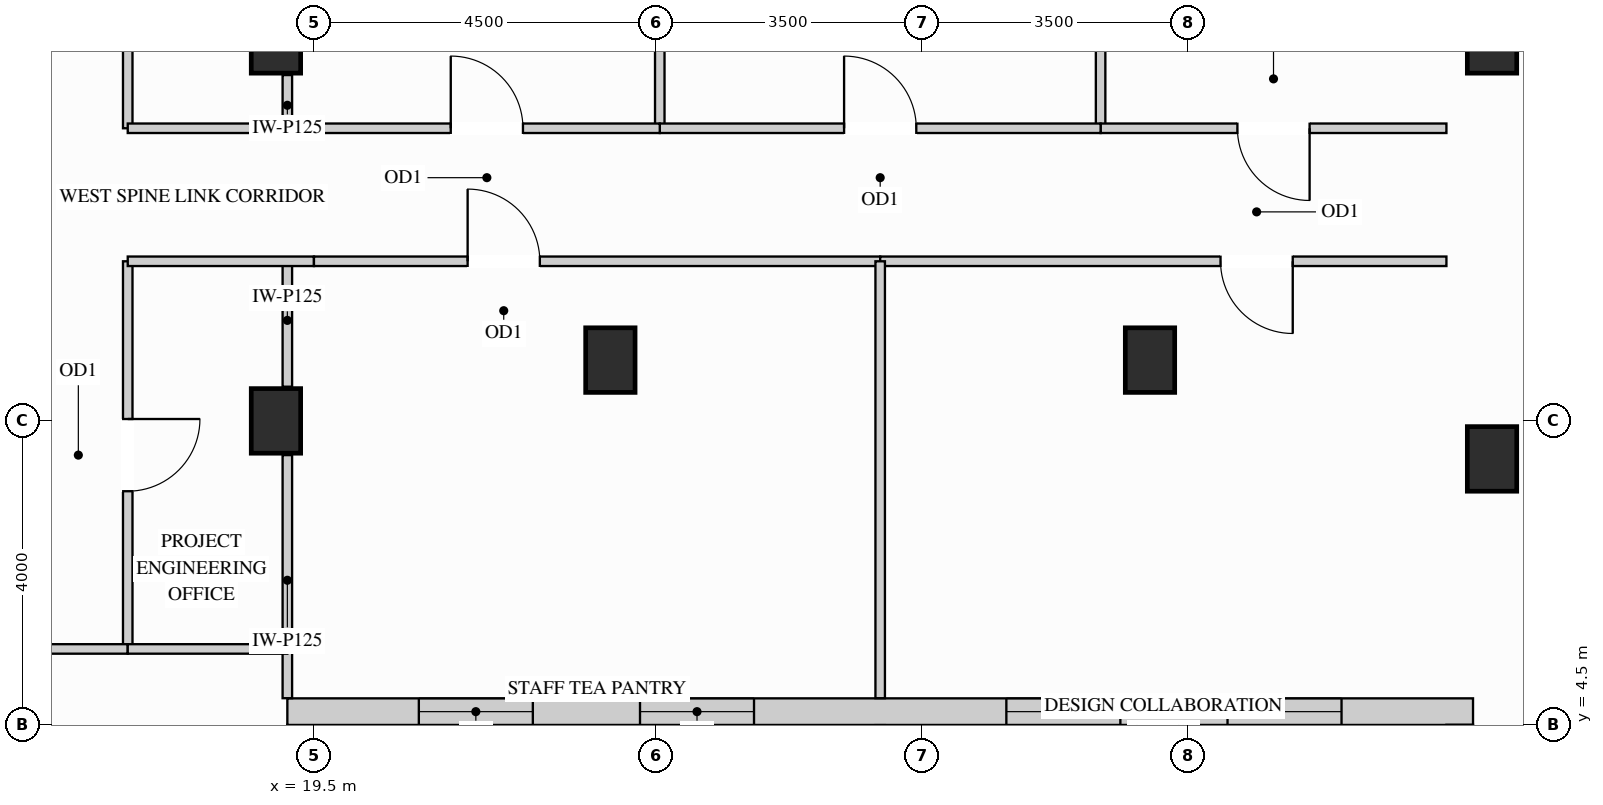
"""IFC4 building model, lengths in metres.
Left out: names, types, materials, properties, quantities, classifications, styles, units other than length and angle.
Written with IfcOpenShell. Run it as: python <this file> out.ifc"""

import sys

from ifc_helpers import new_model, si_unit, direction, frame, frame_2d, origin, origin_2d, place, context, subcontext, project, spatial, rectangle, extrude, source, transform, mapped, element, fill, save


model = new_model("IFC4")
c1 = context("Model", 3, precision=1e-05, world=origin(), true_north=direction((0.0, 1.0)))
c2 = subcontext(c1, "Body", "Model", "MODEL_VIEW")
j1 = project(units=[si_unit("LENGTHUNIT", "METRE"), si_unit("PLANEANGLEUNIT", "RADIAN")], contexts=[c1])
p1 = place(None, origin())
s1 = spatial("IfcSite", under=j1, at=p1, CompositionType="ELEMENT")
p2 = place(p1, origin())
s2 = spatial("IfcBuilding", under=s1, at=p2, CompositionType="ELEMENT")
p3 = place(p2, frame((0.0, 0.0, 216.0)))
s3 = spatial("IfcBuildingStorey", under=s2, at=p3, CompositionType="ELEMENT", Elevation=216.0)
m1 = source(origin(), c2, "Body", "SweptSolid", [
    extrude(rectangle(XDim=0.65, YDim=0.85, at=origin_2d()), origin(), (0.0, 0.0, 1.0), 3.4),
])
for number, where, z_axis, x_axis in (
    (1, (19.0, 13.5, 0.0), (0.0, 0.0, 1.0), (1.0, 0.0, 0.0)),
    (2, (19.0, 8.5, 0.0), (0.0, 0.0, 1.0), (1.0, 0.0, 0.0)),
    (3, (35.0, 13.5, 0.0), (0.0, 0.0, 1.0), (1.0, 0.0, 0.0)),
    (4, (35.0, 8.0, 0.0), (0.0, 0.0, 1.0), (1.0, 0.0, 0.0)),
    (5, (23.4, 9.3, 0.0), (0.0, 0.0, 1.0), (1.0, 0.0, 0.0)),
    (6, (30.5, 9.3, 0.0), (0.0, 0.0, 1.0), (1.0, 0.0, 0.0)),
):
    element("IfcColumn", number, at=place(p3, frame(where, z_axis=z_axis, x_axis=x_axis)), inside=s3, PredefinedType="COLUMN", context=c2, shape_type="MappedRepresentation", body=[
        mapped(m1, transform((0.0, 0.0, 0.0), x_axis=(1.0, 0.0, 0.0), y_axis=(0.0, 1.0, 0.0), z_axis=(0.0, 0.0, 1.0))),
    ])
m2 = source(origin(), c2, "Body", "SweptSolid", [
    extrude(rectangle(XDim=0.579, YDim=0.35, at=frame_2d((0.29, 0.0))), origin(), (0.0, 0.0, 1.0), 2.773),
])
p4 = place(p3, frame((19.325, 3.923, 0.0), z_axis=(0.0, 0.0, 1.0), x_axis=(0.0, 1.0, 0.0)))
e7 = element("IfcWall", 7, at=p4, inside=s3, PredefinedType="SOLIDWALL", context=c2, shape_type="MappedRepresentation", body=[
    mapped(m2, transform((0.0, 0.0, 0.0), x_axis=(1.0, 0.0, 0.0), y_axis=(0.0, 1.0, 0.0), z_axis=(0.0, 0.0, 1.0))),
])
p5 = place(p3, frame((19.15, 4.675, 0.0), z_axis=(0.0, 0.0, 1.0), x_axis=(1.0, 0.0, 0.0)))
e8 = element("IfcWall", 8, at=p5, inside=s3, PredefinedType="SOLIDWALL", context=c2, shape_type="SweptSolid", body=[
    extrude(rectangle(XDim=15.6, YDim=0.35, at=frame_2d((7.8, 0.0))), origin(), (0.0, 0.0, 1.0), 3.385),
])
p6 = place(p5, frame((1.73, 0.0, 0.78)))
e9 = element("IfcOpeningElement", 9, at=p6, cuts=e8, PredefinedType="OPENING", context=c2, shape_type="SweptSolid", body=[
    extrude(rectangle(XDim=1.5, YDim=2.0, at=frame_2d((0.75, 1.0))), frame((0.0, 0.185, 0.0), z_axis=(0.0, -1.0, 0.0), x_axis=(1.0, 0.0, 0.0)), (0.0, 0.0, 1.0), 0.37),
])
p7 = place(p5, frame((4.64, 0.0, 0.78)))
e10 = element("IfcOpeningElement", 10, at=p7, cuts=e8, PredefinedType="OPENING", context=c2, shape_type="SweptSolid", body=[
    extrude(rectangle(XDim=1.5, YDim=2.0, at=frame_2d((0.75, 1.0))), frame((0.0, 0.185, 0.0), z_axis=(0.0, -1.0, 0.0), x_axis=(1.0, 0.0, 0.0)), (0.0, 0.0, 1.0), 0.37),
])
p8 = place(p5, frame((9.46, 0.0, 0.78)))
e11 = element("IfcOpeningElement", 11, at=p8, cuts=e8, PredefinedType="OPENING", context=c2, shape_type="SweptSolid", body=[
    extrude(rectangle(XDim=1.5, YDim=2.0, at=frame_2d((0.75, 1.0))), frame((0.0, 0.185, 0.0), z_axis=(0.0, -1.0, 0.0), x_axis=(1.0, 0.0, 0.0)), (0.0, 0.0, 1.0), 0.37),
])
p9 = place(p5, frame((12.37, 0.0, 0.78)))
e12 = element("IfcOpeningElement", 12, at=p9, cuts=e8, PredefinedType="OPENING", context=c2, shape_type="SweptSolid", body=[
    extrude(rectangle(XDim=1.5, YDim=2.0, at=frame_2d((0.75, 1.0))), frame((0.0, 0.185, 0.0), z_axis=(0.0, -1.0, 0.0), x_axis=(1.0, 0.0, 0.0)), (0.0, 0.0, 1.0), 0.37),
])
m3 = source(origin(), c2, "Body", "SweptSolid", [
    extrude(rectangle(XDim=0.579, YDim=0.35, at=frame_2d((0.29, 0.0))), origin(), (0.0, 0.0, 1.0), 3.385),
])
p10 = place(p3, frame((34.575, 4.502, 0.0), z_axis=(0.0, 0.0, 1.0), x_axis=(0.0, -1.0, 0.0)))
e13 = element("IfcWall", 13, at=p10, inside=s3, PredefinedType="SOLIDWALL", context=c2, shape_type="MappedRepresentation", body=[
    mapped(m3, transform((0.0, 0.0, 0.0), x_axis=(1.0, 0.0, 0.0), y_axis=(0.0, 1.0, 0.0), z_axis=(0.0, 0.0, 1.0))),
])
m4 = source(origin(), c2, "Body", "SweptSolid", [
    extrude(rectangle(XDim=0.7, YDim=0.125, at=frame_2d((0.35, 0.0))), origin(), (0.0, 0.0, 1.0), 2.773),
])
p11 = place(p3, frame((19.15, 12.35, 0.0), z_axis=(0.0, 0.0, 1.0), x_axis=(0.0, 1.0, 0.0)))
e14 = element("IfcWall", 14, at=p11, inside=s3, PredefinedType="PARTITIONING", context=c2, shape_type="MappedRepresentation", body=[
    mapped(m4, transform((0.0, 0.0, 0.0), x_axis=(1.0, 0.0, 0.0), y_axis=(0.0, 1.0, 0.0), z_axis=(0.0, 0.0, 1.0))),
])
m5 = source(origin(), c2, "Body", "SweptSolid", [
    extrude(rectangle(XDim=3.198, YDim=0.125, at=frame_2d((1.599, 0.0))), origin(), (0.0, 0.0, 1.0), 2.773),
])
p12 = place(p3, frame((19.15, 4.852, 0.0), z_axis=(0.0, 0.0, 1.0), x_axis=(0.0, 1.0, 0.0)))
e15 = element("IfcWall", 15, at=p12, inside=s3, PredefinedType="PARTITIONING", context=c2, shape_type="MappedRepresentation", body=[
    mapped(m5, transform((0.0, 0.0, 0.0), x_axis=(1.0, 0.0, 0.0), y_axis=(0.0, 1.0, 0.0), z_axis=(0.0, 0.0, 1.0))),
])
m6 = source(origin(), c2, "Body", "SweptSolid", [
    extrude(rectangle(XDim=1.65, YDim=0.125, at=frame_2d((0.825, 0.0))), origin(), (0.0, 0.0, 1.0), 2.773),
])
p13 = place(p3, frame((19.15, 8.95, 0.0), z_axis=(0.0, 0.0, 1.0), x_axis=(0.0, 1.0, 0.0)))
e16 = element("IfcWall", 16, at=p13, inside=s3, PredefinedType="PARTITIONING", context=c2, shape_type="MappedRepresentation", body=[
    mapped(m6, transform((0.0, 0.0, 0.0), x_axis=(1.0, 0.0, 0.0), y_axis=(0.0, 1.0, 0.0), z_axis=(0.0, 0.0, 1.0))),
])
p14 = place(p3, frame((17.05, 12.35, 0.0), z_axis=(0.0, 0.0, 1.0), x_axis=(0.0, 1.0, 0.0)))
e17 = element("IfcWall", 17, at=p14, inside=s3, PredefinedType="PARTITIONING", context=c2, shape_type="SweptSolid", body=[
    extrude(rectangle(XDim=5.75, YDim=0.125, at=frame_2d((2.875, 0.0))), origin(), (0.0, 0.0, 1.0), 3.385),
])
p15 = place(p14, frame((2.4, 0.0, 0.0)))
e18 = element("IfcOpeningElement", 18, at=p15, cuts=e17, PredefinedType="OPENING", context=c2, shape_type="SweptSolid", body=[
    extrude(rectangle(XDim=0.95, YDim=2.15, at=frame_2d((0.475, 1.075))), frame((0.0, 0.073, 0.0), z_axis=(0.0, -1.0, 0.0), x_axis=(1.0, 0.0, 0.0)), (0.0, 0.0, 1.0), 0.145),
])
p16 = place(p3, frame((17.05, 5.5, 0.0), z_axis=(0.0, 0.0, 1.0), x_axis=(0.0, 1.0, 0.0)))
e19 = element("IfcWall", 19, at=p16, inside=s3, PredefinedType="PARTITIONING", context=c2, shape_type="SweptSolid", body=[
    extrude(rectangle(XDim=5.1, YDim=0.125, at=frame_2d((2.55, 0.0))), origin(), (0.0, 0.0, 1.0), 3.385),
])
p17 = place(p16, frame((2.075, 0.0, 0.0)))
e20 = element("IfcOpeningElement", 20, at=p17, cuts=e19, PredefinedType="OPENING", context=c2, shape_type="SweptSolid", body=[
    extrude(rectangle(XDim=0.95, YDim=2.15, at=frame_2d((0.475, 1.075))), frame((0.0, 0.073, 0.0), z_axis=(0.0, -1.0, 0.0), x_axis=(1.0, 0.0, 0.0)), (0.0, 0.0, 1.0), 0.145),
])
m7 = source(origin(), c2, "Body", "SweptSolid", [
    extrude(rectangle(XDim=5.298, YDim=0.125, at=frame_2d((2.649, 0.0))), origin(), (0.0, 0.0, 1.0), 3.385),
])
for number, where, z_axis, x_axis in (
    (21, (24.05, 12.35, 0.0), (0.0, 0.0, 1.0), (0.0, 1.0, 0.0)),
    (22, (29.85, 12.35, 0.0), (0.0, 0.0, 1.0), (0.0, 1.0, 0.0)),
):
    element("IfcWall", number, at=place(p3, frame(where, z_axis=z_axis, x_axis=x_axis)), inside=s3, PredefinedType="PARTITIONING", context=c2, shape_type="MappedRepresentation", body=[
        mapped(m7, transform((0.0, 0.0, 0.0), x_axis=(1.0, 0.0, 0.0), y_axis=(0.0, 1.0, 0.0), z_axis=(0.0, 0.0, 1.0))),
    ])
p18 = place(p3, frame((29.85, 12.35, 0.0), z_axis=(0.0, 0.0, 1.0), x_axis=(1.0, 0.0, 0.0)))
e23 = element("IfcWall", 23, at=p18, inside=s3, PredefinedType="PARTITIONING", context=c2, shape_type="SweptSolid", body=[
    extrude(rectangle(XDim=4.55, YDim=0.125, at=frame_2d((2.275, 0.0))), origin(), (0.0, 0.0, 1.0), 3.385),
])
p19 = place(p18, frame((1.8, 0.0, 0.0)))
e24 = element("IfcOpeningElement", 24, at=p19, cuts=e23, PredefinedType="OPENING", context=c2, shape_type="SweptSolid", body=[
    extrude(rectangle(XDim=0.95, YDim=2.15, at=frame_2d((0.475, 1.075))), frame((0.0, 0.073, 0.0), z_axis=(0.0, -1.0, 0.0), x_axis=(1.0, 0.0, 0.0)), (0.0, 0.0, 1.0), 0.145),
])
p20 = place(p3, frame((24.05, 12.35, 0.0), z_axis=(0.0, 0.0, 1.0), x_axis=(1.0, 0.0, 0.0)))
e25 = element("IfcWall", 25, at=p20, inside=s3, PredefinedType="PARTITIONING", context=c2, shape_type="SweptSolid", body=[
    extrude(rectangle(XDim=5.8, YDim=0.125, at=frame_2d((2.9, 0.0))), origin(), (0.0, 0.0, 1.0), 3.385),
])
p21 = place(p20, frame((2.425, 0.0, 0.0)))
e26 = element("IfcOpeningElement", 26, at=p21, cuts=e25, PredefinedType="OPENING", context=c2, shape_type="SweptSolid", body=[
    extrude(rectangle(XDim=0.95, YDim=2.15, at=frame_2d((0.475, 1.075))), frame((0.0, 0.073, 0.0), z_axis=(0.0, -1.0, 0.0), x_axis=(1.0, 0.0, 0.0)), (0.0, 0.0, 1.0), 0.145),
])
m8 = source(origin(), c2, "Body", "SweptSolid", [
    extrude(rectangle(XDim=2.45, YDim=0.125, at=frame_2d((1.225, 0.0))), origin(), (0.0, 0.0, 1.0), 3.385),
])
p22 = place(p3, frame((17.05, 12.35, 0.0), z_axis=(0.0, 0.0, 1.0), x_axis=(1.0, 0.0, 0.0)))
e27 = element("IfcWall", 27, at=p22, inside=s3, PredefinedType="PARTITIONING", context=c2, shape_type="MappedRepresentation", body=[
    mapped(m8, transform((0.0, 0.0, 0.0), x_axis=(1.0, 0.0, 0.0), y_axis=(0.0, 1.0, 0.0), z_axis=(0.0, 0.0, 1.0))),
])
p23 = place(p3, frame((19.5, 12.35, 0.0), z_axis=(0.0, 0.0, 1.0), x_axis=(1.0, 0.0, 0.0)))
e28 = element("IfcWall", 28, at=p23, inside=s3, PredefinedType="PARTITIONING", context=c2, shape_type="SweptSolid", body=[
    extrude(rectangle(XDim=4.55, YDim=0.125, at=frame_2d((2.275, 0.0))), origin(), (0.0, 0.0, 1.0), 3.385),
])
p24 = place(p23, frame((1.8, 0.0, 0.0)))
e29 = element("IfcOpeningElement", 29, at=p24, cuts=e28, PredefinedType="OPENING", context=c2, shape_type="SweptSolid", body=[
    extrude(rectangle(XDim=0.95, YDim=2.15, at=frame_2d((0.475, 1.075))), frame((0.0, 0.073, 0.0), z_axis=(0.0, -1.0, 0.0), x_axis=(1.0, 0.0, 0.0)), (0.0, 0.0, 1.0), 0.145),
])
p25 = place(p3, frame((17.05, 10.6, 0.0), z_axis=(0.0, 0.0, 1.0), x_axis=(1.0, 0.0, 0.0)))
e30 = element("IfcWall", 30, at=p25, inside=s3, PredefinedType="PARTITIONING", context=c2, shape_type="MappedRepresentation", body=[
    mapped(m8, transform((0.0, 0.0, 0.0), x_axis=(1.0, 0.0, 0.0), y_axis=(0.0, 1.0, 0.0), z_axis=(0.0, 0.0, 1.0))),
])
p26 = place(p3, frame((19.5, 10.6, 0.0), z_axis=(0.0, 0.0, 1.0), x_axis=(1.0, 0.0, 0.0)))
e31 = element("IfcWall", 31, at=p26, inside=s3, PredefinedType="PARTITIONING", context=c2, shape_type="SweptSolid", body=[
    extrude(rectangle(XDim=7.45, YDim=0.125, at=frame_2d((3.725, 0.0))), origin(), (0.0, 0.0, 1.0), 3.385),
])
p27 = place(p26, frame((2.022, 0.0, 0.0)))
e32 = element("IfcOpeningElement", 32, at=p27, cuts=e31, PredefinedType="OPENING", context=c2, shape_type="SweptSolid", body=[
    extrude(rectangle(XDim=0.95, YDim=2.15, at=frame_2d((0.475, 1.075))), frame((0.0, 0.073, 0.0), z_axis=(0.0, -1.0, 0.0), x_axis=(1.0, 0.0, 0.0)), (0.0, 0.0, 1.0), 0.145),
])
p28 = place(p3, frame((26.95, 10.6, 0.0), z_axis=(0.0, 0.0, 1.0), x_axis=(1.0, 0.0, 0.0)))
e33 = element("IfcWall", 33, at=p28, inside=s3, PredefinedType="PARTITIONING", context=c2, shape_type="SweptSolid", body=[
    extrude(rectangle(XDim=7.45, YDim=0.125, at=frame_2d((3.725, 0.0))), origin(), (0.0, 0.0, 1.0), 3.385),
])
p29 = place(p28, frame((4.478, 0.0, 0.0)))
e34 = element("IfcOpeningElement", 34, at=p29, cuts=e33, PredefinedType="OPENING", context=c2, shape_type="SweptSolid", body=[
    extrude(rectangle(XDim=0.95, YDim=2.15, at=frame_2d((0.475, 1.075))), frame((0.0, 0.073, 0.0), z_axis=(0.0, -1.0, 0.0), x_axis=(1.0, 0.0, 0.0)), (0.0, 0.0, 1.0), 0.145),
])
m9 = source(origin(), c2, "Body", "SweptSolid", [
    extrude(rectangle(XDim=5.748, YDim=0.125, at=frame_2d((2.874, 0.0))), origin(), (0.0, 0.0, 1.0), 3.385),
])
p30 = place(p3, frame((26.95, 4.852, 0.0), z_axis=(0.0, 0.0, 1.0), x_axis=(0.0, 1.0, 0.0)))
e35 = element("IfcWall", 35, at=p30, inside=s3, PredefinedType="PARTITIONING", context=c2, shape_type="MappedRepresentation", body=[
    mapped(m9, transform((0.0, 0.0, 0.0), x_axis=(1.0, 0.0, 0.0), y_axis=(0.0, 1.0, 0.0), z_axis=(0.0, 0.0, 1.0))),
])
p31 = place(p3, frame((10.875, 5.5, 0.0), z_axis=(0.0, 0.0, 1.0), x_axis=(1.0, 0.0, 0.0)))
e36 = element("IfcWall", 36, at=p31, inside=s3, PredefinedType="PARTITIONING", context=c2, shape_type="SweptSolid", body=[
    extrude(rectangle(XDim=6.175, YDim=0.125, at=frame_2d((3.087, 0.0))), origin(), (0.0, 0.0, 1.0), 3.385),
])
p32 = place(p31, frame((2.613, 0.0, 0.0)))
e37 = element("IfcOpeningElement", 37, at=p32, cuts=e36, PredefinedType="OPENING", context=c2, shape_type="SweptSolid", body=[
    extrude(rectangle(XDim=0.95, YDim=2.15, at=frame_2d((0.475, 1.075))), frame((0.0, 0.073, 0.0), z_axis=(0.0, -1.0, 0.0), x_axis=(1.0, 0.0, 0.0)), (0.0, 0.0, 1.0), 0.145),
])
m10 = source(origin(), c2, "Body", "SweptSolid", [
    extrude(rectangle(XDim=2.1, YDim=0.125, at=frame_2d((1.05, 0.0))), origin(), (0.0, 0.0, 1.0), 3.385),
])
p33 = place(p3, frame((17.05, 5.5, 0.0), z_axis=(0.0, 0.0, 1.0), x_axis=(1.0, 0.0, 0.0)))
e38 = element("IfcWall", 38, at=p33, inside=s3, PredefinedType="PARTITIONING", context=c2, shape_type="MappedRepresentation", body=[
    mapped(m10, transform((0.0, 0.0, 0.0), x_axis=(1.0, 0.0, 0.0), y_axis=(0.0, 1.0, 0.0), z_axis=(0.0, 0.0, 1.0))),
])
m11 = source(origin(), c2, "Body", "SweptSolid", [
    extrude(rectangle(XDim=0.95, YDim=2.15, at=frame_2d((0.475, 1.075))), frame((0.0, 0.025, 0.0), z_axis=(0.0, -1.0, 0.0), x_axis=(1.0, 0.0, 0.0)), (0.0, 0.0, 1.0), 0.05),
])
p34 = place(p17, origin())
e39 = element("IfcDoor", 39, at=p34, inside=s3, OperationType="SINGLE_SWING_RIGHT", PredefinedType="DOOR", context=c2, shape_type="MappedRepresentation", body=[
    mapped(m11, transform((0.0, 0.0, 0.0), x_axis=(1.0, 0.0, 0.0), y_axis=(0.0, 1.0, 0.0), z_axis=(0.0, 0.0, 1.0))),
])
fill(e20, e39)
p35 = place(p21, origin())
e40 = element("IfcDoor", 40, at=p35, inside=s3, OperationType="SINGLE_SWING_LEFT", PredefinedType="DOOR", context=c2, shape_type="MappedRepresentation", body=[
    mapped(m11, transform((0.0, 0.0, 0.0), x_axis=(1.0, 0.0, 0.0), y_axis=(0.0, 1.0, 0.0), z_axis=(0.0, 0.0, 1.0))),
])
fill(e26, e40)
p36 = place(p24, origin())
e41 = element("IfcDoor", 41, at=p36, inside=s3, OperationType="SINGLE_SWING_LEFT", PredefinedType="DOOR", context=c2, shape_type="MappedRepresentation", body=[
    mapped(m11, transform((0.0, 0.0, 0.0), x_axis=(1.0, 0.0, 0.0), y_axis=(0.0, 1.0, 0.0), z_axis=(0.0, 0.0, 1.0))),
])
fill(e29, e41)
p37 = place(p19, origin())
e42 = element("IfcDoor", 42, at=p37, inside=s3, OperationType="SINGLE_SWING_RIGHT", PredefinedType="DOOR", context=c2, shape_type="MappedRepresentation", body=[
    mapped(m11, transform((0.0, 0.0, 0.0), x_axis=(1.0, 0.0, 0.0), y_axis=(0.0, 1.0, 0.0), z_axis=(0.0, 0.0, 1.0))),
])
fill(e24, e42)
p38 = place(p27, origin())
e43 = element("IfcDoor", 43, at=p38, inside=s3, OperationType="SINGLE_SWING_LEFT", PredefinedType="DOOR", context=c2, shape_type="MappedRepresentation", body=[
    mapped(m11, transform((0.0, 0.0, 0.0), x_axis=(1.0, 0.0, 0.0), y_axis=(0.0, 1.0, 0.0), z_axis=(0.0, 0.0, 1.0))),
])
fill(e32, e43)
p39 = place(p29, origin())
e44 = element("IfcDoor", 44, at=p39, inside=s3, OperationType="SINGLE_SWING_RIGHT", PredefinedType="DOOR", context=c2, shape_type="MappedRepresentation", body=[
    mapped(m11, transform((0.0, 0.0, 0.0), x_axis=(1.0, 0.0, 0.0), y_axis=(0.0, 1.0, 0.0), z_axis=(0.0, 0.0, 1.0))),
])
fill(e34, e44)
m12 = source(origin(), c2, "Body", "SweptSolid", [
    extrude(rectangle(XDim=1.5, YDim=2.0, at=frame_2d((0.75, 1.0))), frame((0.0, 0.03, 0.0), z_axis=(0.0, -1.0, 0.0), x_axis=(1.0, 0.0, 0.0)), (0.0, 0.0, 1.0), 0.06),
])
p40 = place(p6, origin())
e45 = element("IfcWindow", 45, at=p40, inside=s3, PartitioningType="SINGLE_PANEL", PredefinedType="WINDOW", context=c2, shape_type="MappedRepresentation", body=[
    mapped(m12, transform((0.0, 0.0, 0.0), x_axis=(1.0, 0.0, 0.0), y_axis=(0.0, 1.0, 0.0), z_axis=(0.0, 0.0, 1.0))),
])
fill(e9, e45)
p41 = place(p7, origin())
e46 = element("IfcWindow", 46, at=p41, inside=s3, PartitioningType="SINGLE_PANEL", PredefinedType="WINDOW", context=c2, shape_type="MappedRepresentation", body=[
    mapped(m12, transform((0.0, 0.0, 0.0), x_axis=(1.0, 0.0, 0.0), y_axis=(0.0, 1.0, 0.0), z_axis=(0.0, 0.0, 1.0))),
])
fill(e10, e46)
p42 = place(p8, origin())
e47 = element("IfcWindow", 47, at=p42, inside=s3, PartitioningType="SINGLE_PANEL", PredefinedType="WINDOW", context=c2, shape_type="MappedRepresentation", body=[
    mapped(m12, transform((0.0, 0.0, 0.0), x_axis=(1.0, 0.0, 0.0), y_axis=(0.0, 1.0, 0.0), z_axis=(0.0, 0.0, 1.0))),
])
fill(e11, e47)
p43 = place(p9, origin())
e48 = element("IfcWindow", 48, at=p43, inside=s3, PartitioningType="SINGLE_PANEL", PredefinedType="WINDOW", context=c2, shape_type="MappedRepresentation", body=[
    mapped(m12, transform((0.0, 0.0, 0.0), x_axis=(1.0, 0.0, 0.0), y_axis=(0.0, 1.0, 0.0), z_axis=(0.0, 0.0, 1.0))),
])
fill(e12, e48)
save(model, sys.argv[1])
